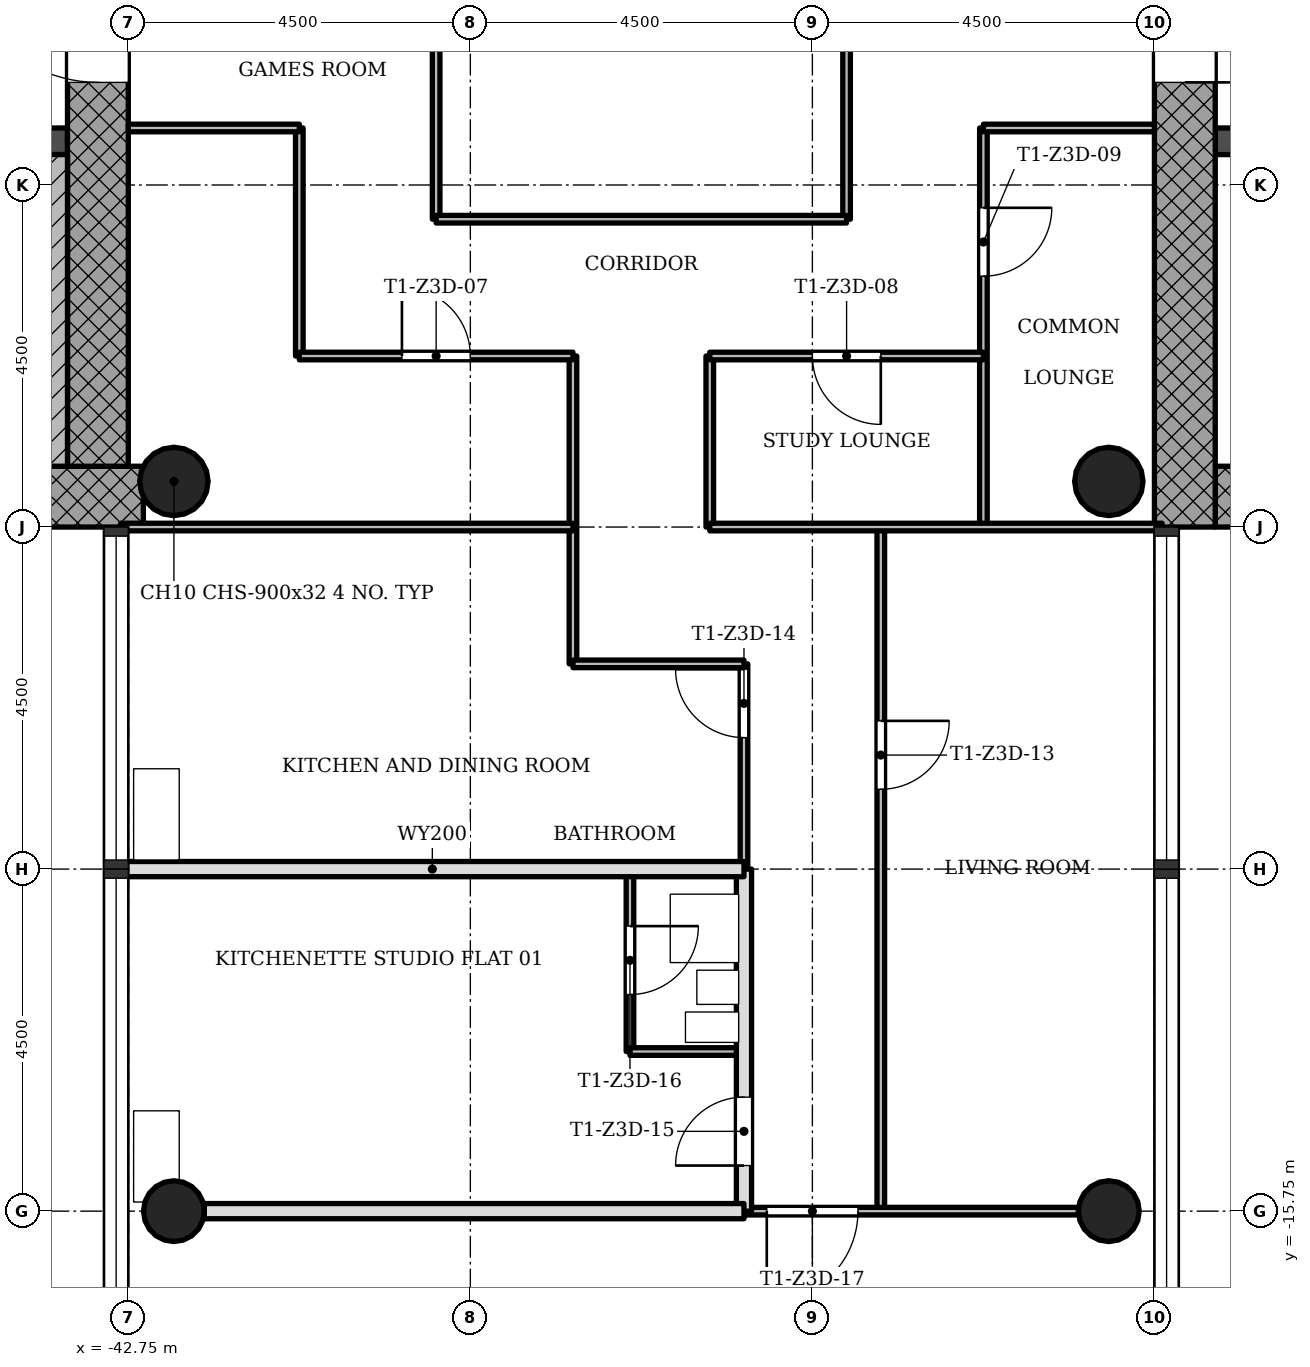
"""IFC4 building model, lengths in metres.
Left out: names, types, materials, properties, quantities, classifications, styles, units other than length and angle.
Written with IfcOpenShell. Run it as: python <this file> out.ifc"""

import sys

from ifc_helpers import new_model, si_unit, direction, frame, frame_2d, origin, origin_2d, place, context, subcontext, project, spatial, rectangle, hollow_circle, extrude, element, fill, save


model = new_model("IFC4")
c1 = context("Model", 3, precision=1e-05, world=origin(), true_north=direction((0.0, 1.0)))
c2 = subcontext(c1, "Body", "Model", "MODEL_VIEW")
j1 = project(units=[si_unit("LENGTHUNIT", "METRE"), si_unit("PLANEANGLEUNIT", "RADIAN")], contexts=[c1])
p1 = place(None, origin())
s1 = spatial("IfcSite", under=j1, at=p1, CompositionType="ELEMENT")
p2 = place(p1, origin())
s2 = spatial("IfcBuilding", under=s1, at=p2, CompositionType="ELEMENT")
p3 = place(p2, frame((0.0, 0.0, 174.5)))
s3 = spatial("IfcBuildingStorey", under=s2, at=p3, CompositionType="ELEMENT", Elevation=174.5)
p4 = place(p3, frame((-28.45, -6.35, 0.0), z_axis=(0.0, 0.0, 1.0), x_axis=(1.0, 0.0, 0.0)))
e1 = element("IfcWall", 1, at=p4, inside=s3, PredefinedType="SHEAR", context=c2, shape_type="SweptSolid", body=[
    extrude(rectangle(XDim=8.2, YDim=0.8, at=frame_2d((4.1, 0.0))), origin(), (0.0, 0.0, 1.0), 3.4),
])
p5 = place(p3, frame((-28.85, 5.95, 0.0), z_axis=(0.0, 0.0, 1.0), x_axis=(0.0, -1.0, 0.0)))
e2 = element("IfcWall", 2, at=p5, inside=s3, PredefinedType="SHEAR", context=c2, shape_type="SweptSolid", body=[
    extrude(rectangle(XDim=12.7, YDim=0.8, at=frame_2d((6.35, 0.0))), origin(), (0.0, 0.0, 1.0), 3.4),
])
p6 = place(p5, frame((5.05, 0.0, 0.0)))
e3 = element("IfcOpeningElement", 3, at=p6, cuts=e2, PredefinedType="OPENING", context=c2, shape_type="SweptSolid", body=[
    extrude(rectangle(XDim=1.8, YDim=2.1, at=frame_2d((0.9, 1.05))), frame((0.0, 0.41, 0.0), z_axis=(0.0, -1.0, 0.0), x_axis=(1.0, 0.0, 0.0)), (0.0, 0.0, 1.0), 0.82),
])
p7 = place(p3, frame((-28.45, -1.675, 0.0), z_axis=(0.0, 0.0, 1.0), x_axis=(1.0, 0.0, 0.0)))
e4 = element("IfcWall", 4, at=p7, inside=s3, PredefinedType="SHEAR", context=c2, shape_type="SweptSolid", body=[
    extrude(rectangle(XDim=7.4, YDim=0.35, at=frame_2d((3.7, 0.0))), origin(), (0.0, 0.0, 1.0), 3.4),
])
p8 = place(p7, frame((0.95, 0.0, 0.0)))
e5 = element("IfcOpeningElement", 5, at=p8, cuts=e4, PredefinedType="OPENING", context=c2, shape_type="SweptSolid", body=[
    extrude(rectangle(XDim=1.1, YDim=2.1, at=frame_2d((0.55, 1.05))), frame((0.0, 0.185, 0.0), z_axis=(0.0, -1.0, 0.0), x_axis=(1.0, 0.0, 0.0)), (0.0, 0.0, 1.0), 0.37),
])
p9 = place(p7, frame((3.15, 0.0, 0.0)))
e6 = element("IfcOpeningElement", 6, at=p9, cuts=e4, PredefinedType="OPENING", context=c2, shape_type="SweptSolid", body=[
    extrude(rectangle(XDim=1.1, YDim=2.1, at=frame_2d((0.55, 1.05))), frame((0.0, 0.185, 0.0), z_axis=(0.0, -1.0, 0.0), x_axis=(1.0, 0.0, 0.0)), (0.0, 0.0, 1.0), 0.37),
])
p10 = place(p7, frame((5.35, 0.0, 0.0)))
e7 = element("IfcOpeningElement", 7, at=p10, cuts=e4, PredefinedType="OPENING", context=c2, shape_type="SweptSolid", body=[
    extrude(rectangle(XDim=1.1, YDim=2.1, at=frame_2d((0.55, 1.05))), frame((0.0, 0.185, 0.0), z_axis=(0.0, -1.0, 0.0), x_axis=(1.0, 0.0, 0.0)), (0.0, 0.0, 1.0), 0.37),
])
p11 = place(p3, frame((-50.95, -6.35, 0.0), z_axis=(0.0, 0.0, 1.0), x_axis=(1.0, 0.0, 0.0)))
e8 = element("IfcWall", 8, at=p11, inside=s3, PredefinedType="SHEAR", context=c2, shape_type="SweptSolid", body=[
    extrude(rectangle(XDim=8.398, YDim=0.8, at=frame_2d((4.199, 0.0))), origin(), (0.0, 0.0, 1.0), 3.4),
])
p12 = place(p3, frame((-43.15, -5.95, 0.0), z_axis=(0.0, 0.0, 1.0), x_axis=(0.0, 1.0, 0.0)))
e9 = element("IfcWall", 9, at=p12, inside=s3, PredefinedType="SHEAR", context=c2, shape_type="SweptSolid", body=[
    extrude(rectangle(XDim=12.7, YDim=0.8, at=frame_2d((6.35, 0.0))), origin(), (0.0, 0.0, 1.0), 3.4),
])
p13 = place(p12, frame((5.05, 0.0, 0.0)))
e10 = element("IfcOpeningElement", 10, at=p13, cuts=e9, PredefinedType="OPENING", context=c2, shape_type="SweptSolid", body=[
    extrude(rectangle(XDim=1.8, YDim=2.1, at=frame_2d((0.9, 1.05))), frame((0.0, 0.41, 0.0), z_axis=(0.0, -1.0, 0.0), x_axis=(1.0, 0.0, 0.0)), (0.0, 0.0, 1.0), 0.82),
])
p14 = place(p3, frame((-50.95, -1.675, 0.0), z_axis=(0.0, 0.0, 1.0), x_axis=(1.0, 0.0, 0.0)))
e11 = element("IfcWall", 11, at=p14, inside=s3, PredefinedType="SHEAR", context=c2, shape_type="SweptSolid", body=[
    extrude(rectangle(XDim=7.4, YDim=0.35, at=frame_2d((3.7, 0.0))), origin(), (0.0, 0.0, 1.0), 3.4),
])
p15 = place(p14, frame((5.65, 0.0, 0.0)))
e12 = element("IfcOpeningElement", 12, at=p15, cuts=e11, PredefinedType="OPENING", context=c2, shape_type="SweptSolid", body=[
    extrude(rectangle(XDim=0.9, YDim=2.1, at=frame_2d((0.45, 1.05))), frame((0.0, 0.185, 0.0), z_axis=(0.0, -1.0, 0.0), x_axis=(1.0, 0.0, 0.0)), (0.0, 0.0, 1.0), 0.37),
])
for number, where, z_axis, x_axis in (
    (13, (-42.15, -15.75, 0.0), (0.0, 0.0, 1.0), (1.0, 0.0, 0.0)),
    (14, (-29.85, -15.75, 0.0), (0.0, 0.0, 1.0), (1.0, 0.0, 0.0)),
):
    element("IfcColumn", number, at=place(p3, frame(where, z_axis=z_axis, x_axis=x_axis)), inside=s3, PredefinedType="COLUMN", context=c2, shape_type="SweptSolid", body=[
        extrude(hollow_circle(Radius=0.4, WallThickness=0.028, at=origin_2d()), origin(), (0.0, 0.0, 1.0), 3.4),
    ])
for number, where, z_axis, x_axis in (
    (15, (-42.15, -6.15, 0.0), (0.0, 0.0, 1.0), (1.0, 0.0, 0.0)),
    (16, (-29.85, -6.15, 0.0), (0.0, 0.0, 1.0), (1.0, 0.0, 0.0)),
):
    element("IfcColumn", number, at=place(p3, frame(where, z_axis=z_axis, x_axis=x_axis)), inside=s3, PredefinedType="COLUMN", context=c2, shape_type="SweptSolid", body=[
        extrude(hollow_circle(Radius=0.45, WallThickness=0.032, at=origin_2d()), origin(), (0.0, 0.0, 1.0), 3.4),
    ])
p16 = place(p3, frame((-40.5, -4.5, 0.0), z_axis=(0.0, 0.0, 1.0), x_axis=(0.0, 1.0, 0.0)))
e17 = element("IfcWall", 17, at=p16, inside=s3, PredefinedType="PARTITIONING", context=c2, shape_type="SweptSolid", body=[
    extrude(rectangle(XDim=3.0, YDim=0.1, at=frame_2d((1.5, 0.0))), origin(), (0.0, 0.0, 1.0), 3.0),
])
p17 = place(p3, frame((-38.7, -2.7, 0.0), z_axis=(0.0, 0.0, 1.0), x_axis=(0.0, 1.0, 0.0)))
e18 = element("IfcWall", 18, at=p17, inside=s3, PredefinedType="PARTITIONING", context=c2, shape_type="SweptSolid", body=[
    extrude(rectangle(XDim=5.4, YDim=0.1, at=frame_2d((2.7, 0.0))), origin(), (0.0, 0.0, 1.0), 3.0),
])
p18 = place(p3, frame((-36.9, -8.55, 0.0), z_axis=(0.0, 0.0, 1.0), x_axis=(0.0, 1.0, 0.0)))
e19 = element("IfcWall", 19, at=p18, inside=s3, PredefinedType="PARTITIONING", context=c2, shape_type="SweptSolid", body=[
    extrude(rectangle(XDim=4.05, YDim=0.1, at=frame_2d((2.025, 0.0))), origin(), (0.0, 0.0, 1.0), 3.0),
])
p19 = place(p3, frame((-36.15, -13.65, 0.0), z_axis=(0.0, 0.0, 1.0), x_axis=(0.0, 1.0, 0.0)))
e20 = element("IfcWall", 20, at=p19, inside=s3, PredefinedType="PARTITIONING", context=c2, shape_type="SweptSolid", body=[
    extrude(rectangle(XDim=2.4, YDim=0.1, at=frame_2d((1.2, 0.0))), origin(), (0.0, 0.0, 1.0), 3.0),
])
p20 = place(p19, frame((0.75, 0.0, 0.0)))
e21 = element("IfcOpeningElement", 21, at=p20, cuts=e20, PredefinedType="OPENING", context=c2, shape_type="SweptSolid", body=[
    extrude(rectangle(XDim=0.9, YDim=2.1, at=frame_2d((0.45, 1.05))), frame((0.0, 0.06, 0.0), z_axis=(0.0, -1.0, 0.0), x_axis=(1.0, 0.0, 0.0)), (0.0, 0.0, 1.0), 0.12),
])
p21 = place(p3, frame((-35.1, -6.75, 0.0), z_axis=(0.0, 0.0, 1.0), x_axis=(0.0, 1.0, 0.0)))
e22 = element("IfcWall", 22, at=p21, inside=s3, PredefinedType="PARTITIONING", context=c2, shape_type="SweptSolid", body=[
    extrude(rectangle(XDim=2.25, YDim=0.1, at=frame_2d((1.125, 0.0))), origin(), (0.0, 0.0, 1.0), 3.0),
])
p22 = place(p3, frame((-34.65, -11.25, 0.0), z_axis=(0.0, 0.0, 1.0), x_axis=(0.0, 1.0, 0.0)))
e23 = element("IfcWall", 23, at=p22, inside=s3, PredefinedType="PARTITIONING", context=c2, shape_type="SweptSolid", body=[
    extrude(rectangle(XDim=2.7, YDim=0.1, at=frame_2d((1.35, 0.0))), origin(), (0.0, 0.0, 1.0), 3.0),
])
p23 = place(p22, frame((1.73, 0.0, 0.0)))
e24 = element("IfcOpeningElement", 24, at=p23, cuts=e23, PredefinedType="OPENING", context=c2, shape_type="SweptSolid", body=[
    extrude(rectangle(XDim=0.9, YDim=2.1, at=frame_2d((0.45, 1.05))), frame((0.0, 0.06, 0.0), z_axis=(0.0, -1.0, 0.0), x_axis=(1.0, 0.0, 0.0)), (0.0, 0.0, 1.0), 0.12),
])
p24 = place(p3, frame((-34.65, -15.75, 0.0), z_axis=(0.0, 0.0, 1.0), x_axis=(0.0, 1.0, 0.0)))
e25 = element("IfcWall", 25, at=p24, inside=s3, PredefinedType="SOLIDWALL", context=c2, shape_type="SweptSolid", body=[
    extrude(rectangle(XDim=4.5, YDim=0.2, at=frame_2d((2.25, 0.0))), origin(), (0.0, 0.0, 1.0), 3.0),
])
p25 = place(p24, frame((0.6, 0.0, 0.0)))
e26 = element("IfcOpeningElement", 26, at=p25, cuts=e25, PredefinedType="OPENING", context=c2, shape_type="SweptSolid", body=[
    extrude(rectangle(XDim=0.9, YDim=2.1, at=frame_2d((0.45, 1.05))), frame((0.0, 0.11, 0.0), z_axis=(0.0, -1.0, 0.0), x_axis=(1.0, 0.0, 0.0)), (0.0, 0.0, 1.0), 0.22),
])
p26 = place(p3, frame((-33.3, -2.7, 0.0), z_axis=(0.0, 0.0, 1.0), x_axis=(0.0, 1.0, 0.0)))
e27 = element("IfcWall", 27, at=p26, inside=s3, PredefinedType="PARTITIONING", context=c2, shape_type="SweptSolid", body=[
    extrude(rectangle(XDim=5.4, YDim=0.1, at=frame_2d((2.7, 0.0))), origin(), (0.0, 0.0, 1.0), 3.0),
])
p27 = place(p26, frame((2.25, 0.0, 0.0)))
e28 = element("IfcOpeningElement", 28, at=p27, cuts=e27, PredefinedType="OPENING", context=c2, shape_type="SweptSolid", body=[
    extrude(rectangle(XDim=0.9, YDim=2.1, at=frame_2d((0.45, 1.05))), frame((0.0, 0.06, 0.0), z_axis=(0.0, -1.0, 0.0), x_axis=(1.0, 0.0, 0.0)), (0.0, 0.0, 1.0), 0.12),
])
p28 = place(p3, frame((-32.85, -15.75, 0.0), z_axis=(0.0, 0.0, 1.0), x_axis=(0.0, 1.0, 0.0)))
e29 = element("IfcWall", 29, at=p28, inside=s3, PredefinedType="PARTITIONING", context=c2, shape_type="SweptSolid", body=[
    extrude(rectangle(XDim=9.0, YDim=0.1, at=frame_2d((4.5, 0.0))), origin(), (0.0, 0.0, 1.0), 3.0),
])
p29 = place(p28, frame((5.55, 0.0, 0.0)))
e30 = element("IfcOpeningElement", 30, at=p29, cuts=e29, PredefinedType="OPENING", context=c2, shape_type="SweptSolid", body=[
    extrude(rectangle(XDim=0.9, YDim=2.1, at=frame_2d((0.45, 1.05))), frame((0.0, 0.06, 0.0), z_axis=(0.0, -1.0, 0.0), x_axis=(1.0, 0.0, 0.0)), (0.0, 0.0, 1.0), 0.12),
])
p30 = place(p3, frame((-31.5, -6.75, 0.0), z_axis=(0.0, 0.0, 1.0), x_axis=(0.0, 1.0, 0.0)))
e31 = element("IfcWall", 31, at=p30, inside=s3, PredefinedType="PARTITIONING", context=c2, shape_type="SweptSolid", body=[
    extrude(rectangle(XDim=5.25, YDim=0.1, at=frame_2d((2.625, 0.0))), origin(), (0.0, 0.0, 1.0), 3.0),
])
p31 = place(p30, frame((3.3, 0.0, 0.0)))
e32 = element("IfcOpeningElement", 32, at=p31, cuts=e31, PredefinedType="OPENING", context=c2, shape_type="SweptSolid", body=[
    extrude(rectangle(XDim=0.9, YDim=2.1, at=frame_2d((0.45, 1.05))), frame((0.0, 0.06, 0.0), z_axis=(0.0, -1.0, 0.0), x_axis=(1.0, 0.0, 0.0)), (0.0, 0.0, 1.0), 0.12),
])
p32 = place(p3, frame((-34.65, -15.75, 0.0), z_axis=(0.0, 0.0, 1.0), x_axis=(1.0, 0.0, 0.0)))
e33 = element("IfcWall", 33, at=p32, inside=s3, PredefinedType="PARTITIONING", context=c2, shape_type="SweptSolid", body=[
    extrude(rectangle(XDim=4.4, YDim=0.1, at=frame_2d((2.2, 0.0))), origin(), (0.0, 0.0, 1.0), 3.0),
])
p33 = place(p32, frame((0.3, 0.0, 0.0)))
e34 = element("IfcOpeningElement", 34, at=p33, cuts=e33, PredefinedType="OPENING", context=c2, shape_type="SweptSolid", body=[
    extrude(rectangle(XDim=1.2, YDim=2.1, at=frame_2d((0.6, 1.05))), frame((0.0, 0.06, 0.0), z_axis=(0.0, -1.0, 0.0), x_axis=(1.0, 0.0, 0.0)), (0.0, 0.0, 1.0), 0.12),
])
p34 = place(p3, frame((-41.75, -15.75, 0.0), z_axis=(0.0, 0.0, 1.0), x_axis=(1.0, 0.0, 0.0)))
e35 = element("IfcWall", 35, at=p34, inside=s3, PredefinedType="SOLIDWALL", context=c2, shape_type="SweptSolid", body=[
    extrude(rectangle(XDim=7.1, YDim=0.2, at=frame_2d((3.55, 0.0))), origin(), (0.0, 0.0, 1.0), 3.0),
])
p35 = place(p3, frame((-36.15, -13.65, 0.0), z_axis=(0.0, 0.0, 1.0), x_axis=(1.0, 0.0, 0.0)))
e36 = element("IfcWall", 36, at=p35, inside=s3, PredefinedType="PARTITIONING", context=c2, shape_type="SweptSolid", body=[
    extrude(rectangle(XDim=1.5, YDim=0.1, at=frame_2d((0.75, 0.0))), origin(), (0.0, 0.0, 1.0), 3.0),
])
p36 = place(p3, frame((-42.85, -11.25, 0.0), z_axis=(0.0, 0.0, 1.0), x_axis=(1.0, 0.0, 0.0)))
e37 = element("IfcWall", 37, at=p36, inside=s3, PredefinedType="SOLIDWALL", context=c2, shape_type="SweptSolid", body=[
    extrude(rectangle(XDim=8.2, YDim=0.2, at=frame_2d((4.1, 0.0))), origin(), (0.0, 0.0, 1.0), 3.0),
])
p37 = place(p3, frame((-36.9, -8.55, 0.0), z_axis=(0.0, 0.0, 1.0), x_axis=(1.0, 0.0, 0.0)))
e38 = element("IfcWall", 38, at=p37, inside=s3, PredefinedType="PARTITIONING", context=c2, shape_type="SweptSolid", body=[
    extrude(rectangle(XDim=2.25, YDim=0.1, at=frame_2d((1.125, 0.0))), origin(), (0.0, 0.0, 1.0), 3.0),
])
for number, where, z_axis, x_axis in (
    (39, (-42.85, -6.75, 0.0), (0.0, 0.0, 1.0), (1.0, 0.0, 0.0)),
    (40, (-35.1, -6.75, 0.0), (0.0, 0.0, 1.0), (1.0, 0.0, 0.0)),
):
    element("IfcWall", number, at=place(p3, frame(where, z_axis=z_axis, x_axis=x_axis)), inside=s3, PredefinedType="PARTITIONING", context=c2, shape_type="SweptSolid", body=[
        extrude(rectangle(XDim=5.95, YDim=0.1, at=frame_2d((2.975, 0.0))), origin(), (0.0, 0.0, 1.0), 3.0),
    ])
p38 = place(p3, frame((-40.5, -4.5, 0.0), z_axis=(0.0, 0.0, 1.0), x_axis=(1.0, 0.0, 0.0)))
e41 = element("IfcWall", 41, at=p38, inside=s3, PredefinedType="PARTITIONING", context=c2, shape_type="SweptSolid", body=[
    extrude(rectangle(XDim=3.6, YDim=0.1, at=frame_2d((1.8, 0.0))), origin(), (0.0, 0.0, 1.0), 3.0),
])
p39 = place(p38, frame((1.35, 0.0, 0.0)))
e42 = element("IfcOpeningElement", 42, at=p39, cuts=e41, PredefinedType="OPENING", context=c2, shape_type="SweptSolid", body=[
    extrude(rectangle(XDim=0.9, YDim=2.1, at=frame_2d((0.45, 1.05))), frame((0.0, 0.06, 0.0), z_axis=(0.0, -1.0, 0.0), x_axis=(1.0, 0.0, 0.0)), (0.0, 0.0, 1.0), 0.12),
])
p40 = place(p3, frame((-35.1, -4.5, 0.0), z_axis=(0.0, 0.0, 1.0), x_axis=(1.0, 0.0, 0.0)))
e43 = element("IfcWall", 43, at=p40, inside=s3, PredefinedType="PARTITIONING", context=c2, shape_type="SweptSolid", body=[
    extrude(rectangle(XDim=3.6, YDim=0.1, at=frame_2d((1.8, 0.0))), origin(), (0.0, 0.0, 1.0), 3.0),
])
p41 = place(p40, frame((1.35, 0.0, 0.0)))
e44 = element("IfcOpeningElement", 44, at=p41, cuts=e43, PredefinedType="OPENING", context=c2, shape_type="SweptSolid", body=[
    extrude(rectangle(XDim=0.9, YDim=2.1, at=frame_2d((0.45, 1.05))), frame((0.0, 0.06, 0.0), z_axis=(0.0, -1.0, 0.0), x_axis=(1.0, 0.0, 0.0)), (0.0, 0.0, 1.0), 0.12),
])
p42 = place(p3, frame((-38.7, -2.7, 0.0), z_axis=(0.0, 0.0, 1.0), x_axis=(1.0, 0.0, 0.0)))
e45 = element("IfcWall", 45, at=p42, inside=s3, PredefinedType="PARTITIONING", context=c2, shape_type="SweptSolid", body=[
    extrude(rectangle(XDim=5.4, YDim=0.1, at=frame_2d((2.7, 0.0))), origin(), (0.0, 0.0, 1.0), 3.0),
])
for number, where, z_axis, x_axis in (
    (46, (-42.75, -1.5, 0.0), (0.0, 0.0, 1.0), (1.0, 0.0, 0.0)),
    (47, (-31.5, -1.5, 0.0), (0.0, 0.0, 1.0), (1.0, 0.0, 0.0)),
):
    element("IfcWall", number, at=place(p3, frame(where, z_axis=z_axis, x_axis=x_axis)), inside=s3, PredefinedType="PARTITIONING", context=c2, shape_type="SweptSolid", body=[
        extrude(rectangle(XDim=2.25, YDim=0.1, at=frame_2d((1.125, 0.0))), origin(), (0.0, 0.0, 1.0), 3.0),
    ])
p43 = place(p3, frame((-43.75, -1.85, 0.0), z_axis=(0.0, 0.0, 1.0), x_axis=(0.0, -1.0, 0.0)))
e48 = element("IfcWall", 48, at=p43, inside=s3, PredefinedType="SHEAR", context=c2, shape_type="SweptSolid", body=[
    extrude(rectangle(XDim=4.1, YDim=0.4, at=frame_2d((2.05, 0.0))), origin(), (0.0, 0.0, 1.0), 3.4),
])
p44 = place(p39, origin())
e49 = element("IfcDoor", 49, at=p44, inside=s3, OperationType="SINGLE_SWING_RIGHT", PredefinedType="DOOR", context=c2, shape_type="SweptSolid", body=[
    extrude(rectangle(XDim=0.9, YDim=2.1, at=frame_2d((0.45, 1.05))), frame((0.0, 0.025, 0.0), z_axis=(0.0, -1.0, 0.0), x_axis=(1.0, 0.0, 0.0)), (0.0, 0.0, 1.0), 0.05),
])
fill(e42, e49)
p45 = place(p41, origin())
e50 = element("IfcDoor", 50, at=p45, inside=s3, OperationType="SINGLE_SWING_RIGHT", PredefinedType="DOOR", context=c2, shape_type="SweptSolid", body=[
    extrude(rectangle(XDim=0.9, YDim=2.1, at=frame_2d((0.45, 1.05))), frame((0.0, 0.025, 0.0), z_axis=(0.0, -1.0, 0.0), x_axis=(1.0, 0.0, 0.0)), (0.0, 0.0, 1.0), 0.05),
])
fill(e44, e50)
p46 = place(p31, origin())
e51 = element("IfcDoor", 51, at=p46, inside=s3, OperationType="SINGLE_SWING_RIGHT", PredefinedType="DOOR", context=c2, shape_type="SweptSolid", body=[
    extrude(rectangle(XDim=0.9, YDim=2.1, at=frame_2d((0.45, 1.05))), frame((0.0, 0.025, 0.0), z_axis=(0.0, -1.0, 0.0), x_axis=(1.0, 0.0, 0.0)), (0.0, 0.0, 1.0), 0.05),
])
fill(e32, e51)
p47 = place(p29, origin())
e52 = element("IfcDoor", 52, at=p47, inside=s3, OperationType="SINGLE_SWING_RIGHT", PredefinedType="DOOR", context=c2, shape_type="SweptSolid", body=[
    extrude(rectangle(XDim=0.9, YDim=2.1, at=frame_2d((0.45, 1.05))), frame((0.0, 0.025, 0.0), z_axis=(0.0, -1.0, 0.0), x_axis=(1.0, 0.0, 0.0)), (0.0, 0.0, 1.0), 0.05),
])
fill(e30, e52)
p48 = place(p23, origin())
e53 = element("IfcDoor", 53, at=p48, inside=s3, OperationType="SINGLE_SWING_LEFT", PredefinedType="DOOR", context=c2, shape_type="SweptSolid", body=[
    extrude(rectangle(XDim=0.9, YDim=2.1, at=frame_2d((0.45, 1.05))), frame((0.0, 0.025, 0.0), z_axis=(0.0, -1.0, 0.0), x_axis=(1.0, 0.0, 0.0)), (0.0, 0.0, 1.0), 0.05),
])
fill(e24, e53)
p49 = place(p25, origin())
e54 = element("IfcDoor", 54, at=p49, inside=s3, OperationType="SINGLE_SWING_RIGHT", PredefinedType="DOOR", context=c2, shape_type="SweptSolid", body=[
    extrude(rectangle(XDim=0.9, YDim=2.1, at=frame_2d((0.45, 1.05))), frame((0.0, 0.025, 0.0), z_axis=(0.0, -1.0, 0.0), x_axis=(1.0, 0.0, 0.0)), (0.0, 0.0, 1.0), 0.05),
])
fill(e26, e54)
p50 = place(p20, origin())
e55 = element("IfcDoor", 55, at=p50, inside=s3, OperationType="SINGLE_SWING_RIGHT", PredefinedType="DOOR", context=c2, shape_type="SweptSolid", body=[
    extrude(rectangle(XDim=0.9, YDim=2.1, at=frame_2d((0.45, 1.05))), frame((0.0, 0.025, 0.0), z_axis=(0.0, -1.0, 0.0), x_axis=(1.0, 0.0, 0.0)), (0.0, 0.0, 1.0), 0.05),
])
fill(e21, e55)
p51 = place(p33, origin())
e56 = element("IfcDoor", 56, at=p51, inside=s3, OperationType="SINGLE_SWING_LEFT", PredefinedType="DOOR", context=c2, shape_type="SweptSolid", body=[
    extrude(rectangle(XDim=1.2, YDim=2.1, at=frame_2d((0.6, 1.05))), frame((0.0, 0.025, 0.0), z_axis=(0.0, -1.0, 0.0), x_axis=(1.0, 0.0, 0.0)), (0.0, 0.0, 1.0), 0.05),
])
fill(e34, e56)
p52 = place(p6, origin())
e57 = element("IfcDoor", 57, at=p52, inside=s3, OperationType="SINGLE_SWING_LEFT", PredefinedType="DOOR", context=c2, shape_type="SweptSolid", body=[
    extrude(rectangle(XDim=1.8, YDim=2.1, at=frame_2d((0.9, 1.05))), frame((0.0, 0.025, 0.0), z_axis=(0.0, -1.0, 0.0), x_axis=(1.0, 0.0, 0.0)), (0.0, 0.0, 1.0), 0.05),
])
fill(e3, e57)
p53 = place(p13, origin())
e58 = element("IfcDoor", 58, at=p53, inside=s3, OperationType="SINGLE_SWING_LEFT", PredefinedType="DOOR", context=c2, shape_type="SweptSolid", body=[
    extrude(rectangle(XDim=1.8, YDim=2.1, at=frame_2d((0.9, 1.05))), frame((0.0, 0.025, 0.0), z_axis=(0.0, -1.0, 0.0), x_axis=(1.0, 0.0, 0.0)), (0.0, 0.0, 1.0), 0.05),
])
fill(e10, e58)
save(model, sys.argv[1])
